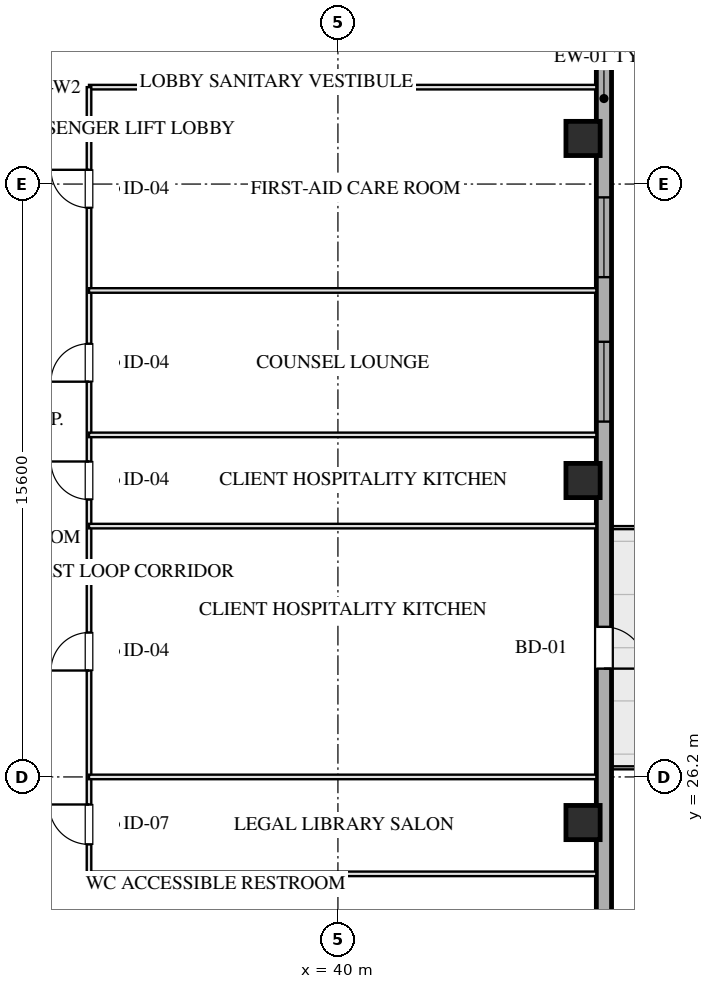
"""IFC4 building model, lengths in metres.
Left out: names, types, materials, properties, quantities, classifications, styles, units other than length and angle.
Written with IfcOpenShell. Run it as: python <this file> out.ifc"""

import sys

from ifc_helpers import new_model, si_unit, direction, frame, frame_2d, origin, origin_2d, place, context, subcontext, project, spatial, rectangle, hollow_rectangle, extrude, element, fill, save


model = new_model("IFC4")
c1 = context("Model", 3, precision=1e-05, world=origin(), true_north=direction((0.0, 1.0)))
c2 = subcontext(c1, "Body", "Model", "MODEL_VIEW")
j1 = project(units=[si_unit("LENGTHUNIT", "METRE"), si_unit("PLANEANGLEUNIT", "RADIAN")], contexts=[c1])
p1 = place(None, origin())
s1 = spatial("IfcSite", under=j1, at=p1, CompositionType="ELEMENT")
p2 = place(p1, origin())
s2 = spatial("IfcBuilding", under=s1, at=p2, CompositionType="ELEMENT")
p3 = place(p2, frame((0.0, 0.0, 188.6)))
s3 = spatial("IfcBuildingStorey", under=s2, at=p3, CompositionType="ELEMENT", Elevation=188.6)
for number, where, z_axis, x_axis in (
    (1, (46.45, 25.0, 0.0), (0.0, 0.0, 1.0), (1.0, 0.0, 0.0)),
    (2, (46.45, 34.0, 0.0), (0.0, 0.0, 1.0), (1.0, 0.0, 0.0)),
    (3, (46.45, 43.0, 0.0), (0.0, 0.0, 1.0), (1.0, 0.0, 0.0)),
):
    element("IfcColumn", number, at=place(p3, frame(where, z_axis=z_axis, x_axis=x_axis)), inside=s3, PredefinedType="COLUMN", context=c2, shape_type="SweptSolid", body=[
        extrude(hollow_rectangle(XDim=0.9, YDim=0.9, WallThickness=0.032, at=origin_2d()), origin(), (0.0, 0.0, 1.0), 3.451),
    ])
p4 = place(p3, frame((47.0, 57.2, 0.0), z_axis=(0.0, 0.0, 1.0), x_axis=(0.0, -1.0, 0.0)))
e4 = element("IfcWall", 4, at=p4, inside=s3, PredefinedType="SOLIDWALL", context=c2, shape_type="SweptSolid", body=[
    extrude(rectangle(XDim=46.4, YDim=0.4, at=frame_2d((23.2, 0.0))), origin(), (0.0, 0.0, 1.0), 2.61),
])
p5 = place(p4, frame((19.55, 0.0, 0.75)))
e5 = element("IfcOpeningElement", 5, at=p5, cuts=e4, PredefinedType="OPENING", context=c2, shape_type="SweptSolid", body=[
    extrude(rectangle(XDim=2.1, YDim=1.46, at=frame_2d((1.05, 0.73))), frame((0.0, 0.21, 0.0), z_axis=(0.0, -1.0, 0.0), x_axis=(1.0, 0.0, 0.0)), (0.0, 0.0, 1.0), 0.42),
])
p6 = place(p4, frame((15.75, 0.0, 0.75)))
e6 = element("IfcOpeningElement", 6, at=p6, cuts=e4, PredefinedType="OPENING", context=c2, shape_type="SweptSolid", body=[
    extrude(rectangle(XDim=2.1, YDim=1.46, at=frame_2d((1.05, 0.73))), frame((0.0, 0.21, 0.0), z_axis=(0.0, -1.0, 0.0), x_axis=(1.0, 0.0, 0.0)), (0.0, 0.0, 1.0), 0.42),
])
p7 = place(p4, frame((27.05, 0.0, 0.0)))
e7 = element("IfcOpeningElement", 7, at=p7, cuts=e4, PredefinedType="OPENING", context=c2, shape_type="SweptSolid", body=[
    extrude(rectangle(XDim=1.1, YDim=2.15, at=frame_2d((0.55, 1.075))), frame((0.0, 0.21, 0.0), z_axis=(0.0, -1.0, 0.0), x_axis=(1.0, 0.0, 0.0)), (0.0, 0.0, 1.0), 0.42),
])
for number, where, z_axis, x_axis in (
    (8, (33.45, 23.65, 0.0), (0.0, 0.0, 1.0), (1.0, 0.0, 0.0)),
    (9, (33.45, 44.35, 0.0), (0.0, 0.0, 1.0), (1.0, 0.0, 0.0)),
):
    element("IfcWall", number, at=place(p3, frame(where, z_axis=z_axis, x_axis=x_axis)), inside=s3, PredefinedType="PARTITIONING", context=c2, shape_type="SweptSolid", body=[
        extrude(rectangle(XDim=13.35, YDim=0.12, at=frame_2d((6.675, 0.0))), origin(), (0.0, 0.0, 1.0), 3.175),
    ])
p8 = place(p3, frame((33.45, 23.65, 0.0), z_axis=(0.0, 0.0, 1.0), x_axis=(0.0, 1.0, 0.0)))
e10 = element("IfcWall", 10, at=p8, inside=s3, PredefinedType="PARTITIONING", context=c2, shape_type="SweptSolid", body=[
    extrude(rectangle(XDim=20.7, YDim=0.12, at=frame_2d((10.35, 0.0))), origin(), (0.0, 0.0, 1.0), 3.175),
])
p9 = place(p8, frame((0.775, 0.0, 0.0)))
e11 = element("IfcOpeningElement", 11, at=p9, cuts=e10, PredefinedType="OPENING", context=c2, shape_type="SweptSolid", body=[
    extrude(rectangle(XDim=1.05, YDim=2.05, at=frame_2d((0.525, 1.025))), frame((0.0, 0.07, 0.0), z_axis=(0.0, -1.0, 0.0), x_axis=(1.0, 0.0, 0.0)), (0.0, 0.0, 1.0), 0.14),
])
p10 = place(p8, frame((5.35, 0.0, 0.0)))
e12 = element("IfcOpeningElement", 12, at=p10, cuts=e10, PredefinedType="OPENING", context=c2, shape_type="SweptSolid", body=[
    extrude(rectangle(XDim=1.0, YDim=2.05, at=frame_2d((0.5, 1.025))), frame((0.0, 0.07, 0.0), z_axis=(0.0, -1.0, 0.0), x_axis=(1.0, 0.0, 0.0)), (0.0, 0.0, 1.0), 0.14),
])
p11 = place(p8, frame((9.85, 0.0, 0.0)))
e13 = element("IfcOpeningElement", 13, at=p11, cuts=e10, PredefinedType="OPENING", context=c2, shape_type="SweptSolid", body=[
    extrude(rectangle(XDim=1.0, YDim=2.05, at=frame_2d((0.5, 1.025))), frame((0.0, 0.07, 0.0), z_axis=(0.0, -1.0, 0.0), x_axis=(1.0, 0.0, 0.0)), (0.0, 0.0, 1.0), 0.14),
])
p12 = place(p8, frame((12.95, 0.0, 0.0)))
e14 = element("IfcOpeningElement", 14, at=p12, cuts=e10, PredefinedType="OPENING", context=c2, shape_type="SweptSolid", body=[
    extrude(rectangle(XDim=1.0, YDim=2.05, at=frame_2d((0.5, 1.025))), frame((0.0, 0.07, 0.0), z_axis=(0.0, -1.0, 0.0), x_axis=(1.0, 0.0, 0.0)), (0.0, 0.0, 1.0), 0.14),
])
p13 = place(p8, frame((17.525, 0.0, 0.0)))
e15 = element("IfcOpeningElement", 15, at=p13, cuts=e10, PredefinedType="OPENING", context=c2, shape_type="SweptSolid", body=[
    extrude(rectangle(XDim=1.0, YDim=2.05, at=frame_2d((0.5, 1.025))), frame((0.0, 0.07, 0.0), z_axis=(0.0, -1.0, 0.0), x_axis=(1.0, 0.0, 0.0)), (0.0, 0.0, 1.0), 0.14),
])
for number, where, z_axis, x_axis in (
    (16, (33.45, 26.2, 0.0), (0.0, 0.0, 1.0), (1.0, 0.0, 0.0)),
    (17, (33.45, 32.8, 0.0), (0.0, 0.0, 1.0), (1.0, 0.0, 0.0)),
    (18, (33.45, 35.2, 0.0), (0.0, 0.0, 1.0), (1.0, 0.0, 0.0)),
    (19, (33.45, 39.0, 0.0), (0.0, 0.0, 1.0), (1.0, 0.0, 0.0)),
):
    element("IfcWall", number, at=place(p3, frame(where, z_axis=z_axis, x_axis=x_axis)), inside=s3, PredefinedType="PARTITIONING", context=c2, shape_type="SweptSolid", body=[
        extrude(rectangle(XDim=13.35, YDim=0.12, at=frame_2d((6.675, 0.0))), origin(), (0.0, 0.0, 1.0), 3.175),
    ])
p14 = place(p5, origin())
e20 = element("IfcWindow", 20, at=p14, inside=s3, PartitioningType="TRIPLE_PANEL_VERTICAL", PredefinedType="WINDOW", context=c2, shape_type="SweptSolid", body=[
    extrude(rectangle(XDim=2.1, YDim=1.46, at=frame_2d((1.05, 0.73))), frame((0.0, 0.03, 0.0), z_axis=(0.0, -1.0, 0.0), x_axis=(1.0, 0.0, 0.0)), (0.0, 0.0, 1.0), 0.06),
])
fill(e5, e20)
p15 = place(p6, origin())
e21 = element("IfcWindow", 21, at=p15, inside=s3, PartitioningType="TRIPLE_PANEL_VERTICAL", PredefinedType="WINDOW", context=c2, shape_type="SweptSolid", body=[
    extrude(rectangle(XDim=2.1, YDim=1.46, at=frame_2d((1.05, 0.73))), frame((0.0, 0.03, 0.0), z_axis=(0.0, -1.0, 0.0), x_axis=(1.0, 0.0, 0.0)), (0.0, 0.0, 1.0), 0.06),
])
fill(e6, e21)
p16 = place(p7, origin())
e22 = element("IfcDoor", 22, at=p16, inside=s3, OperationType="SINGLE_SWING_RIGHT", PredefinedType="DOOR", context=c2, shape_type="SweptSolid", body=[
    extrude(rectangle(XDim=1.1, YDim=2.15, at=frame_2d((0.55, 1.075))), frame((0.0, 0.025, 0.0), z_axis=(0.0, -1.0, 0.0), x_axis=(1.0, 0.0, 0.0)), (0.0, 0.0, 1.0), 0.05),
])
fill(e7, e22)
p17 = place(p9, origin())
e23 = element("IfcDoor", 23, at=p17, inside=s3, OperationType="SINGLE_SWING_RIGHT", PredefinedType="DOOR", context=c2, shape_type="SweptSolid", body=[
    extrude(rectangle(XDim=1.05, YDim=2.05, at=frame_2d((0.525, 1.025))), frame((0.0, 0.025, 0.0), z_axis=(0.0, -1.0, 0.0), x_axis=(1.0, 0.0, 0.0)), (0.0, 0.0, 1.0), 0.05),
])
fill(e11, e23)
p18 = place(p10, origin())
e24 = element("IfcDoor", 24, at=p18, inside=s3, OperationType="SINGLE_SWING_LEFT", PredefinedType="DOOR", context=c2, shape_type="SweptSolid", body=[
    extrude(rectangle(XDim=1.0, YDim=2.05, at=frame_2d((0.5, 1.025))), frame((0.0, 0.025, 0.0), z_axis=(0.0, -1.0, 0.0), x_axis=(1.0, 0.0, 0.0)), (0.0, 0.0, 1.0), 0.05),
])
fill(e12, e24)
p19 = place(p11, origin())
e25 = element("IfcDoor", 25, at=p19, inside=s3, OperationType="SINGLE_SWING_RIGHT", PredefinedType="DOOR", context=c2, shape_type="SweptSolid", body=[
    extrude(rectangle(XDim=1.0, YDim=2.05, at=frame_2d((0.5, 1.025))), frame((0.0, 0.025, 0.0), z_axis=(0.0, -1.0, 0.0), x_axis=(1.0, 0.0, 0.0)), (0.0, 0.0, 1.0), 0.05),
])
fill(e13, e25)
p20 = place(p12, origin())
e26 = element("IfcDoor", 26, at=p20, inside=s3, OperationType="SINGLE_SWING_LEFT", PredefinedType="DOOR", context=c2, shape_type="SweptSolid", body=[
    extrude(rectangle(XDim=1.0, YDim=2.05, at=frame_2d((0.5, 1.025))), frame((0.0, 0.025, 0.0), z_axis=(0.0, -1.0, 0.0), x_axis=(1.0, 0.0, 0.0)), (0.0, 0.0, 1.0), 0.05),
])
fill(e14, e26)
p21 = place(p13, origin())
e27 = element("IfcDoor", 27, at=p21, inside=s3, OperationType="SINGLE_SWING_RIGHT", PredefinedType="DOOR", context=c2, shape_type="SweptSolid", body=[
    extrude(rectangle(XDim=1.0, YDim=2.05, at=frame_2d((0.5, 1.025))), frame((0.0, 0.025, 0.0), z_axis=(0.0, -1.0, 0.0), x_axis=(1.0, 0.0, 0.0)), (0.0, 0.0, 1.0), 0.05),
])
fill(e15, e27)
save(model, sys.argv[1])
